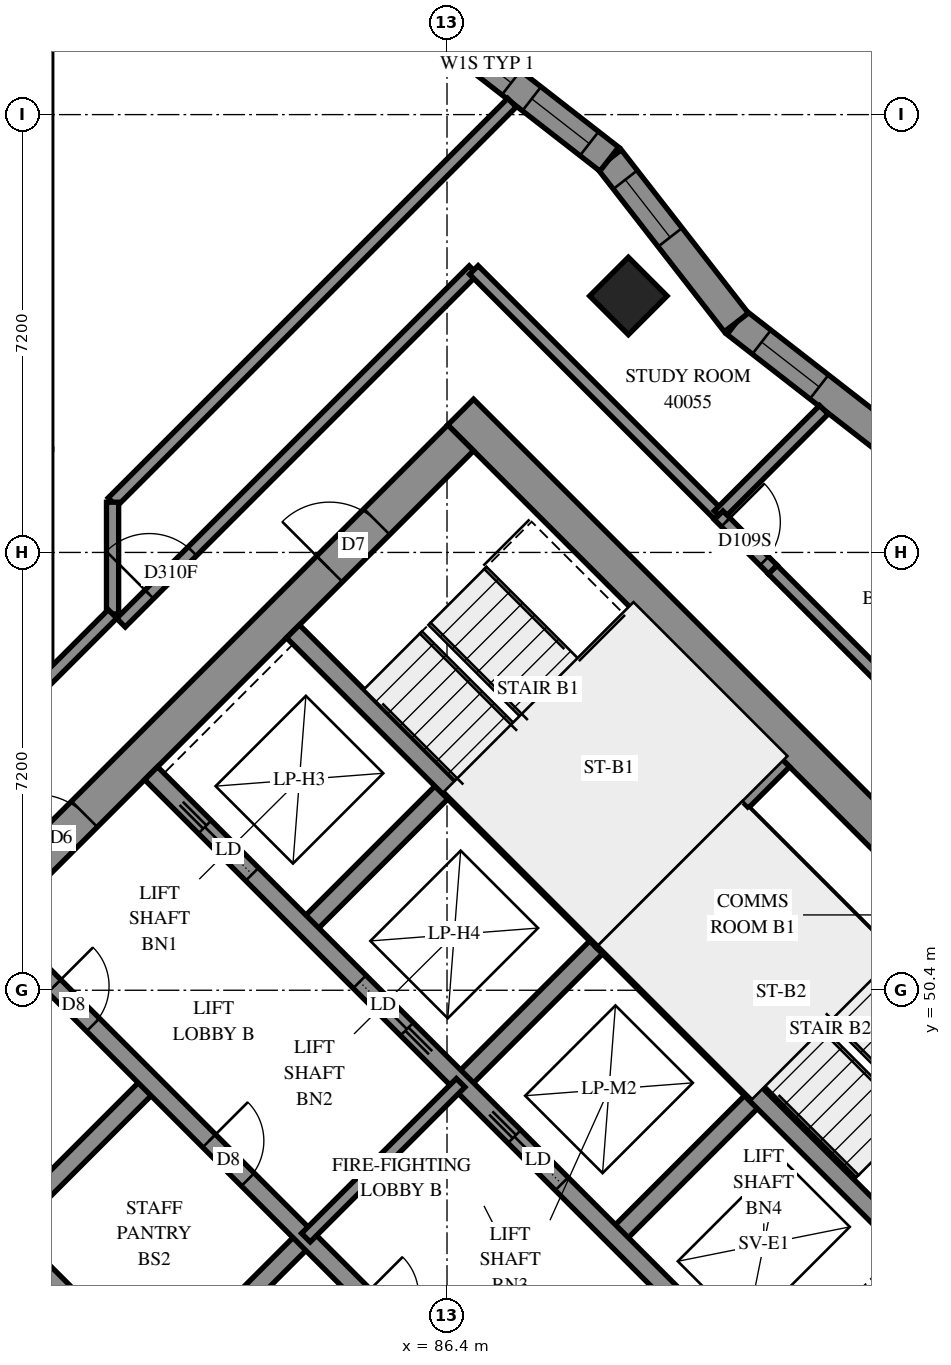
"""IFC4 building model, lengths in metres.
Left out: names, types, materials, properties, quantities, classifications, styles, units other than length and angle.
Written with IfcOpenShell. Run it as: python <this file> out.ifc"""

import sys

from ifc_helpers import new_model, si_unit, direction, frame, frame_2d, origin, origin_2d, place, context, subcontext, project, spatial, polyline, rectangle, outline, extrude, element, fill, save


model = new_model("IFC4")
c1 = context("Model", 3, precision=1e-05, world=origin(), true_north=direction((0.0, 1.0)))
c2 = subcontext(c1, "Body", "Model", "MODEL_VIEW")
j1 = project(units=[si_unit("LENGTHUNIT", "METRE"), si_unit("PLANEANGLEUNIT", "RADIAN")], contexts=[c1])
p1 = place(None, origin())
s1 = spatial("IfcSite", under=j1, at=p1, CompositionType="ELEMENT")
p2 = place(p1, origin())
s2 = spatial("IfcBuilding", under=s1, at=p2, CompositionType="ELEMENT")
p3 = place(p2, frame((0.0, 0.0, 149.0)))
s3 = spatial("IfcBuildingStorey", under=s2, at=p3, CompositionType="ELEMENT", Elevation=149.0)
p4 = place(p3, frame((89.382, 61.818, 0.0), z_axis=(0.0, 0.0, 1.0), x_axis=(0.7071067812, -0.7071067812, 0.0)))
e1 = element("IfcColumn", 1, at=p4, inside=s3, PredefinedType="COLUMN", context=c2, shape_type="SweptSolid", body=[
    extrude(rectangle(XDim=0.9, YDim=0.9, at=origin_2d()), origin(), (0.0, 0.0, 1.0), 3.1),
])
p5 = place(p3, frame((76.018, 49.302, -0.3), z_axis=(0.0, 0.0, 1.0), x_axis=(0.7071067812, -0.7071067812, 0.0)))
e2 = element("IfcWall", 2, at=p5, inside=s3, PredefinedType="SHEAR", context=c2, shape_type="SweptSolid", body=[
    extrude(rectangle(XDim=15.6, YDim=0.6, at=frame_2d((7.8, 0.0))), origin(), (0.0, 0.0, 1.0), 2.7),
])
p6 = place(p3, frame((86.625, 59.908, -0.3), z_axis=(0.0, 0.0, 1.0), x_axis=(0.7071067812, -0.7071067812, 0.0)))
e3 = element("IfcWall", 3, at=p6, inside=s3, PredefinedType="SHEAR", context=c2, shape_type="SweptSolid", body=[
    extrude(rectangle(XDim=15.6, YDim=0.6, at=frame_2d((7.8, 0.0))), origin(), (0.0, 0.0, 1.0), 2.7),
])
p7 = place(p6, frame((10.6, 0.0, 0.3)))
e4 = element("IfcOpeningElement", 4, at=p7, cuts=e3, PredefinedType="OPENING", context=c2, shape_type="SweptSolid", body=[
    extrude(rectangle(XDim=0.8, YDim=2.1, at=frame_2d((0.4, 1.05))), frame((0.0, 0.31, 0.0), z_axis=(0.0, -1.0, 0.0), x_axis=(1.0, 0.0, 0.0)), (0.0, 0.0, 1.0), 0.62),
])
p8 = place(p3, frame((76.442, 49.302, -0.3), z_axis=(0.0, 0.0, 1.0), x_axis=(0.7071067812, 0.7071067812, 0.0)))
e5 = element("IfcWall", 5, at=p8, inside=s3, PredefinedType="SHEAR", context=c2, shape_type="SweptSolid", body=[
    extrude(rectangle(XDim=14.4, YDim=0.6, at=frame_2d((7.2, 0.0))), origin(), (0.0, 0.0, 1.0), 2.7),
])
p9 = place(p8, frame((4.55, 0.0, 0.3)))
e6 = element("IfcOpeningElement", 6, at=p9, cuts=e5, PredefinedType="OPENING", context=c2, shape_type="SweptSolid", body=[
    extrude(rectangle(XDim=1.1, YDim=2.1, at=frame_2d((0.55, 1.05))), frame((0.0, 0.31, 0.0), z_axis=(0.0, -1.0, 0.0), x_axis=(1.0, 0.0, 0.0)), (0.0, 0.0, 1.0), 0.62),
])
p10 = place(p8, frame((11.35, 0.0, 0.3)))
e7 = element("IfcOpeningElement", 7, at=p10, cuts=e5, PredefinedType="OPENING", context=c2, shape_type="SweptSolid", body=[
    extrude(rectangle(XDim=1.1, YDim=2.1, at=frame_2d((0.55, 1.05))), frame((0.0, 0.31, 0.0), z_axis=(0.0, -1.0, 0.0), x_axis=(1.0, 0.0, 0.0)), (0.0, 0.0, 1.0), 0.62),
])
p11 = place(p3, frame((87.049, 38.695, -0.3), z_axis=(0.0, 0.0, 1.0), x_axis=(0.7071067812, 0.7071067812, 0.0)))
e8 = element("IfcWall", 8, at=p11, inside=s3, PredefinedType="SHEAR", context=c2, shape_type="SweptSolid", body=[
    extrude(rectangle(XDim=14.4, YDim=0.6, at=frame_2d((7.2, 0.0))), origin(), (0.0, 0.0, 1.0), 2.7),
])
p12 = place(p11, frame((4.55, 0.0, 0.3)))
e9 = element("IfcOpeningElement", 9, at=p12, cuts=e8, PredefinedType="OPENING", context=c2, shape_type="SweptSolid", body=[
    extrude(rectangle(XDim=1.1, YDim=2.1, at=frame_2d((0.55, 1.05))), frame((0.0, 0.31, 0.0), z_axis=(0.0, -1.0, 0.0), x_axis=(1.0, 0.0, 0.0)), (0.0, 0.0, 1.0), 0.62),
])
p13 = place(p11, frame((11.35, 0.0, 0.3)))
e10 = element("IfcOpeningElement", 10, at=p13, cuts=e8, PredefinedType="OPENING", context=c2, shape_type="SweptSolid", body=[
    extrude(rectangle(XDim=1.1, YDim=2.1, at=frame_2d((0.55, 1.05))), frame((0.0, 0.31, 0.0), z_axis=(0.0, -1.0, 0.0), x_axis=(1.0, 0.0, 0.0)), (0.0, 0.0, 1.0), 0.62),
])
for number, where, z_axis, x_axis in (
    (11, (79.2, 46.544, 0.0), (0.0, 0.0, 1.0), (0.707, 0.707, 0.0)),
    (12, (84.079, 51.423, 0.0), (0.0, 0.0, 1.0), (0.707, 0.707, 0.0)),
):
    element("IfcWall", number, at=place(p3, frame(where, z_axis=z_axis, x_axis=x_axis)), inside=s3, PredefinedType="SOLIDWALL", context=c2, shape_type="SweptSolid", body=[
        extrude(rectangle(XDim=3.3, YDim=0.3, at=frame_2d((1.65, 0.0))), origin(), (0.0, 0.0, 1.0), 3.1),
    ])
p14 = place(p3, frame((81.746, 43.999, 0.0), z_axis=(0.0, 0.0, 1.0), x_axis=(0.7071067812, 0.7071067812, 0.0)))
e13 = element("IfcWall", 13, at=p14, inside=s3, PredefinedType="SOLIDWALL", context=c2, shape_type="SweptSolid", body=[
    extrude(rectangle(XDim=3.3, YDim=0.3, at=frame_2d((1.65, 0.0))), origin(), (0.0, 0.0, 1.0), 3.1),
])
for number, where, z_axis, x_axis in (
    (14, (86.625, 48.878, 0.0), (0.0, 0.0, 1.0), (0.707, 0.707, 0.0)),
    (15, (89.17, 46.332, 0.0), (0.0, 0.0, 1.0), (0.707, 0.707, 0.0)),
):
    element("IfcWall", number, at=place(p3, frame(where, z_axis=z_axis, x_axis=x_axis)), inside=s3, PredefinedType="SOLIDWALL", context=c2, shape_type="SweptSolid", body=[
        extrude(rectangle(XDim=3.3, YDim=0.3, at=frame_2d((1.65, 0.0))), origin(), (0.0, 0.0, 1.0), 3.1),
    ])
p15 = place(p3, frame((78.988, 51.423, 0.0), z_axis=(0.0, 0.0, 1.0), x_axis=(0.7071067812, -0.7071067812, 0.0)))
e16 = element("IfcWall", 16, at=p15, inside=s3, PredefinedType="SOLIDWALL", context=c2, shape_type="SweptSolid", body=[
    extrude(rectangle(XDim=14.4, YDim=0.3, at=frame_2d((7.2, 0.0))), origin(), (0.0, 0.0, 1.0), 3.1),
])
p16 = place(p15, frame((1.35, 0.0, 0.0)))
e17 = element("IfcOpeningElement", 17, at=p16, cuts=e16, PredefinedType="OPENING", context=c2, shape_type="SweptSolid", body=[
    extrude(rectangle(XDim=0.9, YDim=2.1, at=frame_2d((0.45, 1.05))), frame((0.0, 0.16, 0.0), z_axis=(0.0, -1.0, 0.0), x_axis=(1.0, 0.0, 0.0)), (0.0, 0.0, 1.0), 0.32),
])
p17 = place(p15, frame((4.95, 0.0, 0.0)))
e18 = element("IfcOpeningElement", 18, at=p17, cuts=e16, PredefinedType="OPENING", context=c2, shape_type="SweptSolid", body=[
    extrude(rectangle(XDim=0.9, YDim=2.1, at=frame_2d((0.45, 1.05))), frame((0.0, 0.16, 0.0), z_axis=(0.0, -1.0, 0.0), x_axis=(1.0, 0.0, 0.0)), (0.0, 0.0, 1.0), 0.32),
])
p18 = place(p15, frame((8.55, 0.0, 0.0)))
e19 = element("IfcOpeningElement", 19, at=p18, cuts=e16, PredefinedType="OPENING", context=c2, shape_type="SweptSolid", body=[
    extrude(rectangle(XDim=0.9, YDim=2.1, at=frame_2d((0.45, 1.05))), frame((0.0, 0.16, 0.0), z_axis=(0.0, -1.0, 0.0), x_axis=(1.0, 0.0, 0.0)), (0.0, 0.0, 1.0), 0.32),
])
p19 = place(p15, frame((12.05, 0.0, 0.0)))
e20 = element("IfcOpeningElement", 20, at=p19, cuts=e16, PredefinedType="OPENING", context=c2, shape_type="SweptSolid", body=[
    extrude(rectangle(XDim=1.1, YDim=2.1, at=frame_2d((0.55, 1.05))), frame((0.0, 0.16, 0.0), z_axis=(0.0, -1.0, 0.0), x_axis=(1.0, 0.0, 0.0)), (0.0, 0.0, 1.0), 0.32),
])
p20 = place(p3, frame((81.534, 53.969, 0.0), z_axis=(0.0, 0.0, 1.0), x_axis=(0.707103309, -0.7071102534, 0.0)))
e21 = element("IfcWall", 21, at=p20, inside=s3, PredefinedType="SOLIDWALL", context=c2, shape_type="SweptSolid", body=[
    extrude(rectangle(XDim=14.4, YDim=0.3, at=frame_2d((7.2, 0.0))), origin(), (0.0, 0.0, 1.0), 3.1),
])
p21 = place(p20, frame((1.25, 0.0, 0.0)))
e22 = element("IfcOpeningElement", 22, at=p21, cuts=e21, PredefinedType="OPENING", context=c2, shape_type="SweptSolid", body=[
    extrude(rectangle(XDim=1.1, YDim=2.1, at=frame_2d((0.55, 1.05))), frame((0.0, 0.16, 0.0), z_axis=(0.0, -1.0, 0.0), x_axis=(1.0, 0.0, 0.0)), (0.0, 0.0, 1.0), 0.32),
])
p22 = place(p20, frame((4.85, 0.0, 0.0)))
e23 = element("IfcOpeningElement", 23, at=p22, cuts=e21, PredefinedType="OPENING", context=c2, shape_type="SweptSolid", body=[
    extrude(rectangle(XDim=1.1, YDim=2.1, at=frame_2d((0.55, 1.05))), frame((0.0, 0.16, 0.0), z_axis=(0.0, -1.0, 0.0), x_axis=(1.0, 0.0, 0.0)), (0.0, 0.0, 1.0), 0.32),
])
p23 = place(p20, frame((8.45, 0.0, 0.0)))
e24 = element("IfcOpeningElement", 24, at=p23, cuts=e21, PredefinedType="OPENING", context=c2, shape_type="SweptSolid", body=[
    extrude(rectangle(XDim=1.1, YDim=2.1, at=frame_2d((0.55, 1.05))), frame((0.0, 0.16, 0.0), z_axis=(0.0, -1.0, 0.0), x_axis=(1.0, 0.0, 0.0)), (0.0, 0.0, 1.0), 0.32),
])
p24 = place(p20, frame((12.05, 0.0, 0.0)))
e25 = element("IfcOpeningElement", 25, at=p24, cuts=e21, PredefinedType="OPENING", context=c2, shape_type="SweptSolid", body=[
    extrude(rectangle(XDim=1.1, YDim=2.1, at=frame_2d((0.55, 1.05))), frame((0.0, 0.16, 0.0), z_axis=(0.0, -1.0, 0.0), x_axis=(1.0, 0.0, 0.0)), (0.0, 0.0, 1.0), 0.32),
])
for number, where, z_axis, x_axis in (
    (26, (83.867, 56.302, 0.0), (0.0, 0.0, 1.0), (0.707, -0.707, 0.0)),
    (27, (88.958, 51.211, 0.0), (0.0, 0.0, 1.0), (0.707, -0.707, 0.0)),
):
    element("IfcWall", number, at=place(p3, frame(where, z_axis=z_axis, x_axis=x_axis)), inside=s3, PredefinedType="SOLIDWALL", context=c2, shape_type="SweptSolid", body=[
        extrude(rectangle(XDim=7.2, YDim=0.3, at=frame_2d((3.6, 0.0))), origin(), (0.0, 0.0, 1.0), 3.1),
    ])
p25 = place(p3, frame((88.958, 51.211, 0.0), z_axis=(0.0, 0.0, 1.0), x_axis=(0.7071067812, 0.7071067812, 0.0)))
e28 = element("IfcWall", 28, at=p25, inside=s3, PredefinedType="SOLIDWALL", context=c2, shape_type="SweptSolid", body=[
    extrude(rectangle(XDim=4.2, YDim=0.3, at=frame_2d((2.1, 0.0))), origin(), (0.0, 0.0, 1.0), 3.1),
])
p26 = place(p3, frame((93.844, 59.293, 0.0), z_axis=(0.0, 0.0, 1.0), x_axis=(-0.7891591282, 0.6141887905, 0.0)))
e29 = element("IfcWall", 29, at=p26, inside=s3, PredefinedType="SOLIDWALL", context=c2, shape_type="SweptSolid", body=[
    extrude(outline(polyline([(-0.031, -0.25), (3.372, -0.25), (3.434, 0.25), (0.031, 0.25), (-0.031, -0.25)])), origin(), (0.0, 0.0, 1.0), 3.1),
])
p27 = place(p26, frame((1.677, 0.0, 0.45)))
e30 = element("IfcOpeningElement", 30, at=p27, cuts=e29, PredefinedType="OPENING", context=c2, shape_type="SweptSolid", body=[
    extrude(rectangle(XDim=1.2, YDim=2.5, at=frame_2d((0.6, 1.25))), frame((0.0, 0.26, 0.0), z_axis=(0.0, -1.0, 0.0), x_axis=(1.0, 0.0, 0.0)), (0.0, 0.0, 1.0), 0.52),
])
p28 = place(p3, frame((91.158, 61.383, 0.0), z_axis=(0.0, 0.0, 1.0), x_axis=(-0.6141847326, 0.7891622864, 0.0)))
e31 = element("IfcWall", 31, at=p28, inside=s3, PredefinedType="SOLIDWALL", context=c2, shape_type="SweptSolid", body=[
    extrude(outline(polyline([(0.031, -0.25), (3.434, -0.25), (3.372, 0.25), (-0.031, 0.25), (0.031, -0.25)])), origin(), (0.0, 0.0, 1.0), 3.1),
])
p29 = place(p28, frame((1.774, 0.0, 0.45)))
e32 = element("IfcOpeningElement", 32, at=p29, cuts=e31, PredefinedType="OPENING", context=c2, shape_type="SweptSolid", body=[
    extrude(rectangle(XDim=1.2, YDim=2.5, at=frame_2d((0.6, 1.25))), frame((0.0, 0.26, 0.0), z_axis=(0.0, -1.0, 0.0), x_axis=(1.0, 0.0, 0.0)), (0.0, 0.0, 1.0), 0.52),
])
p30 = place(p3, frame((89.068, 64.068, 0.0), z_axis=(0.0, 0.0, 1.0), x_axis=(-0.7891591282, 0.6141887905, 0.0)))
e33 = element("IfcWall", 33, at=p30, inside=s3, PredefinedType="SOLIDWALL", context=c2, shape_type="SweptSolid", body=[
    extrude(outline(polyline([(-0.031, -0.25), (3.372, -0.25), (3.434, 0.25), (0.031, 0.25), (-0.031, -0.25)])), origin(), (0.0, 0.0, 1.0), 3.1),
])
p31 = place(p30, frame((0.416, 0.0, 0.45)))
e34 = element("IfcOpeningElement", 34, at=p31, cuts=e33, PredefinedType="OPENING", context=c2, shape_type="SweptSolid", body=[
    extrude(rectangle(XDim=1.2, YDim=2.5, at=frame_2d((0.6, 1.25))), frame((0.0, 0.26, 0.0), z_axis=(0.0, -1.0, 0.0), x_axis=(1.0, 0.0, 0.0)), (0.0, 0.0, 1.0), 0.52),
])
p32 = place(p30, frame((2.043, 0.0, 0.45)))
e35 = element("IfcOpeningElement", 35, at=p32, cuts=e33, PredefinedType="OPENING", context=c2, shape_type="SweptSolid", body=[
    extrude(rectangle(XDim=1.0, YDim=2.5, at=frame_2d((0.5, 1.25))), frame((0.0, 0.26, 0.0), z_axis=(0.0, -1.0, 0.0), x_axis=(1.0, 0.0, 0.0)), (0.0, 0.0, 1.0), 0.52),
])
p33 = place(p3, frame((91.313, 53.354, 0.0), z_axis=(0.0, 0.0, 1.0), x_axis=(0.7071067812, -0.7071067812, 0.0)))
e36 = element("IfcWall", 36, at=p33, inside=s3, PredefinedType="PARTITIONING", context=c2, shape_type="SweptSolid", body=[
    extrude(rectangle(XDim=5.95, YDim=0.15, at=frame_2d((2.975, 0.0))), origin(), (0.0, 0.0, 1.0), 3.1),
])
p34 = place(p3, frame((84.079, 46.332, 0.0), z_axis=(0.0, 0.0, 1.0), x_axis=(0.7071067812, 0.7071067812, 0.0)))
e37 = element("IfcWall", 37, at=p34, inside=s3, PredefinedType="PARTITIONING", context=c2, shape_type="SweptSolid", body=[
    extrude(rectangle(XDim=3.6, YDim=0.2, at=frame_2d((1.8, 0.0))), origin(), (0.0, 0.0, 1.0), 3.1),
])
p35 = place(p3, frame((91.755, 57.317, 0.0), z_axis=(0.0, 0.0, 1.0), x_axis=(0.7071067812, -0.7071067812, 0.0)))
e38 = element("IfcWall", 38, at=p35, inside=s3, PredefinedType="PARTITIONING", context=c2, shape_type="SweptSolid", body=[
    extrude(rectangle(XDim=11.639, YDim=0.2, at=frame_2d((5.819, 0.0))), origin(), (0.0, 0.0, 1.0), 3.1),
])
p36 = place(p3, frame((80.899, 58.427, 0.0), z_axis=(0.0, 0.0, 1.0), x_axis=(0.707112163, 0.7071013993, 0.0)))
e39 = element("IfcWall", 39, at=p36, inside=s3, PredefinedType="PARTITIONING", context=c2, shape_type="SweptSolid", body=[
    extrude(rectangle(XDim=9.29, YDim=0.2, at=frame_2d((4.645, 0.0))), origin(), (0.0, 0.0, 1.0), 3.1),
])
p37 = place(p3, frame((81.038, 56.444, 0.0), z_axis=(0.0, 0.0, 1.0), x_axis=(0.7071067812, 0.7071067812, 0.0)))
e40 = element("IfcWall", 40, at=p37, inside=s3, PredefinedType="PARTITIONING", context=c2, shape_type="SweptSolid", body=[
    extrude(rectangle(XDim=8.2, YDim=0.2, at=frame_2d((4.1, 0.0))), origin(), (0.0, 0.0, 1.0), 3.1),
])
p38 = place(p37, frame((0.66, 0.0, 0.0)))
e41 = element("IfcOpeningElement", 41, at=p38, cuts=e40, PredefinedType="OPENING", context=c2, shape_type="SweptSolid", body=[
    extrude(rectangle(XDim=1.0, YDim=2.1, at=frame_2d((0.5, 1.05))), frame((0.0, 0.11, 0.0), z_axis=(0.0, -1.0, 0.0), x_axis=(1.0, 0.0, 0.0)), (0.0, 0.0, 1.0), 0.22),
])
p39 = place(p3, frame((86.841, 62.245, 0.0), z_axis=(0.0, 0.0, 1.0), x_axis=(0.7071067812, -0.7071067812, 0.0)))
e42 = element("IfcWall", 42, at=p39, inside=s3, PredefinedType="PARTITIONING", context=c2, shape_type="SweptSolid", body=[
    extrude(rectangle(XDim=5.699, YDim=0.2, at=frame_2d((2.85, 0.0))), origin(), (0.0, 0.0, 1.0), 3.1),
])
p40 = place(p3, frame((90.867, 58.213, 0.0), z_axis=(0.0, 0.0, 1.0), x_axis=(0.7066165577, 0.707596665, 0.0)))
e43 = element("IfcWall", 43, at=p40, inside=s3, PredefinedType="PARTITIONING", context=c2, shape_type="SweptSolid", body=[
    extrude(rectangle(XDim=2.449, YDim=0.2, at=frame_2d((1.224, 0.0))), origin(), (0.0, 0.0, 1.0), 3.1),
])
p41 = place(p3, frame((80.9, 56.588, 0.0), z_axis=(0.0, 0.0, 1.0), x_axis=(0.0, 1.0, 0.0)))
e44 = element("IfcWall", 44, at=p41, inside=s3, PredefinedType="PARTITIONING", context=c2, shape_type="SweptSolid", body=[
    extrude(rectangle(XDim=1.838, YDim=0.2, at=frame_2d((0.919, 0.0))), origin(), (0.0, 0.0, 1.0), 3.1),
])
p42 = place(p3, frame((79.801, 55.491, 0.0), z_axis=(0.0, 0.0, 1.0), x_axis=(0.7071067812, 0.7071067812, 0.0)))
e45 = element("IfcWall", 45, at=p42, inside=s3, PredefinedType="PARTITIONING", context=c2, shape_type="SweptSolid", body=[
    extrude(rectangle(XDim=1.553, YDim=0.2, at=frame_2d((0.776, 0.0))), origin(), (0.0, 0.0, 1.0), 3.1),
])
p43 = place(p3, frame((90.867, 58.211, 0.0), z_axis=(0.0, 0.0, 1.0), x_axis=(0.706312726, -0.7078999456, 0.0)))
e46 = element("IfcWall", 46, at=p43, inside=s3, PredefinedType="PARTITIONING", context=c2, shape_type="SweptSolid", body=[
    extrude(rectangle(XDim=1.26, YDim=0.2, at=frame_2d((0.63, 0.0))), origin(), (0.0, 0.0, 1.0), 3.1),
])
p44 = place(p43, frame((0.162, 0.0, 0.0)))
e47 = element("IfcOpeningElement", 47, at=p44, cuts=e46, PredefinedType="OPENING", context=c2, shape_type="SweptSolid", body=[
    extrude(rectangle(XDim=0.9, YDim=2.1, at=frame_2d((0.45, 1.05))), frame((0.0, 0.11, 0.0), z_axis=(0.0, -1.0, 0.0), x_axis=(1.0, 0.0, 0.0)), (0.0, 0.0, 1.0), 0.22),
])
p45 = place(p27, origin())
e48 = element("IfcWindow", 48, at=p45, inside=s3, PartitioningType="SINGLE_PANEL", PredefinedType="WINDOW", context=c2, shape_type="SweptSolid", body=[
    extrude(rectangle(XDim=1.2, YDim=2.5, at=frame_2d((0.6, 1.25))), frame((0.0, 0.18, 0.0), z_axis=(0.0, -1.0, 0.0), x_axis=(1.0, 0.0, 0.0)), (0.0, 0.0, 1.0), 0.06),
])
fill(e30, e48)
p46 = place(p29, origin())
e49 = element("IfcWindow", 49, at=p46, inside=s3, PartitioningType="SINGLE_PANEL", PredefinedType="WINDOW", context=c2, shape_type="SweptSolid", body=[
    extrude(rectangle(XDim=1.2, YDim=2.5, at=frame_2d((0.6, 1.25))), frame((0.0, 0.18, 0.0), z_axis=(0.0, -1.0, 0.0), x_axis=(1.0, 0.0, 0.0)), (0.0, 0.0, 1.0), 0.06),
])
fill(e32, e49)
p47 = place(p31, origin())
e50 = element("IfcWindow", 50, at=p47, inside=s3, PartitioningType="SINGLE_PANEL", PredefinedType="WINDOW", context=c2, shape_type="SweptSolid", body=[
    extrude(rectangle(XDim=1.2, YDim=2.5, at=frame_2d((0.6, 1.25))), frame((0.0, 0.18, 0.0), z_axis=(0.0, -1.0, 0.0), x_axis=(1.0, 0.0, 0.0)), (0.0, 0.0, 1.0), 0.06),
])
fill(e34, e50)
p48 = place(p9, origin())
e51 = element("IfcDoor", 51, at=p48, inside=s3, OperationType="DOUBLE_DOOR_SINGLE_SWING", PredefinedType="DOOR", context=c2, shape_type="SweptSolid", body=[
    extrude(rectangle(XDim=1.1, YDim=2.1, at=frame_2d((0.55, 1.05))), frame((0.0, 0.025, 0.0), z_axis=(0.0, -1.0, 0.0), x_axis=(1.0, 0.0, 0.0)), (0.0, 0.0, 1.0), 0.05),
])
fill(e6, e51)
p49 = place(p10, origin())
e52 = element("IfcDoor", 52, at=p49, inside=s3, OperationType="SINGLE_SWING_LEFT", PredefinedType="DOOR", context=c2, shape_type="SweptSolid", body=[
    extrude(rectangle(XDim=1.1, YDim=2.1, at=frame_2d((0.55, 1.05))), frame((0.0, 0.025, 0.0), z_axis=(0.0, -1.0, 0.0), x_axis=(1.0, 0.0, 0.0)), (0.0, 0.0, 1.0), 0.05),
])
fill(e7, e52)
p50 = place(p16, origin())
e53 = element("IfcDoor", 53, at=p50, inside=s3, OperationType="SINGLE_SWING_LEFT", PredefinedType="DOOR", context=c2, shape_type="SweptSolid", body=[
    extrude(rectangle(XDim=0.9, YDim=2.1, at=frame_2d((0.45, 1.05))), frame((0.0, 0.025, 0.0), z_axis=(0.0, -1.0, 0.0), x_axis=(1.0, 0.0, 0.0)), (0.0, 0.0, 1.0), 0.05),
])
fill(e17, e53)
p51 = place(p17, origin())
e54 = element("IfcDoor", 54, at=p51, inside=s3, OperationType="SINGLE_SWING_LEFT", PredefinedType="DOOR", context=c2, shape_type="SweptSolid", body=[
    extrude(rectangle(XDim=0.9, YDim=2.1, at=frame_2d((0.45, 1.05))), frame((0.0, 0.025, 0.0), z_axis=(0.0, -1.0, 0.0), x_axis=(1.0, 0.0, 0.0)), (0.0, 0.0, 1.0), 0.05),
])
fill(e18, e54)
p52 = place(p21, origin())
e55 = element("IfcDoor", 55, at=p52, inside=s3, OperationType="SLIDING_TO_LEFT", PredefinedType="DOOR", context=c2, shape_type="SweptSolid", body=[
    extrude(rectangle(XDim=1.1, YDim=2.1, at=frame_2d((0.55, 1.05))), frame((0.0, 0.025, 0.0), z_axis=(0.0, -1.0, 0.0), x_axis=(1.0, 0.0, 0.0)), (0.0, 0.0, 1.0), 0.05),
])
fill(e22, e55)
p53 = place(p22, origin())
e56 = element("IfcDoor", 56, at=p53, inside=s3, OperationType="SLIDING_TO_RIGHT", PredefinedType="DOOR", context=c2, shape_type="SweptSolid", body=[
    extrude(rectangle(XDim=1.1, YDim=2.1, at=frame_2d((0.55, 1.05))), frame((0.0, 0.025, 0.0), z_axis=(0.0, -1.0, 0.0), x_axis=(1.0, 0.0, 0.0)), (0.0, 0.0, 1.0), 0.05),
])
fill(e23, e56)
p54 = place(p23, origin())
e57 = element("IfcDoor", 57, at=p54, inside=s3, OperationType="SLIDING_TO_LEFT", PredefinedType="DOOR", context=c2, shape_type="SweptSolid", body=[
    extrude(rectangle(XDim=1.1, YDim=2.1, at=frame_2d((0.55, 1.05))), frame((0.0, 0.025, 0.0), z_axis=(0.0, -1.0, 0.0), x_axis=(1.0, 0.0, 0.0)), (0.0, 0.0, 1.0), 0.05),
])
fill(e24, e57)
p55 = place(p38, origin())
e58 = element("IfcDoor", 58, at=p55, inside=s3, OperationType="SINGLE_SWING_RIGHT", PredefinedType="DOOR", context=c2, shape_type="SweptSolid", body=[
    extrude(rectangle(XDim=1.0, YDim=2.1, at=frame_2d((0.5, 1.05))), frame((0.0, 0.025, 0.0), z_axis=(0.0, -1.0, 0.0), x_axis=(1.0, 0.0, 0.0)), (0.0, 0.0, 1.0), 0.05),
])
fill(e41, e58)
p56 = place(p44, origin())
e59 = element("IfcDoor", 59, at=p56, inside=s3, OperationType="SINGLE_SWING_RIGHT", PredefinedType="DOOR", context=c2, shape_type="SweptSolid", body=[
    extrude(rectangle(XDim=0.9, YDim=2.1, at=frame_2d((0.45, 1.05))), frame((0.0, 0.025, 0.0), z_axis=(0.0, -1.0, 0.0), x_axis=(1.0, 0.0, 0.0)), (0.0, 0.0, 1.0), 0.05),
])
fill(e47, e59)
p57 = place(p32, origin())
e60 = element("IfcWindow", 60, at=p57, inside=s3, PartitioningType="SINGLE_PANEL", PredefinedType="WINDOW", context=c2, shape_type="SweptSolid", body=[
    extrude(rectangle(XDim=1.0, YDim=2.5, at=frame_2d((0.5, 1.25))), frame((0.0, 0.18, 0.0), z_axis=(0.0, -1.0, 0.0), x_axis=(1.0, 0.0, 0.0)), (0.0, 0.0, 1.0), 0.06),
])
fill(e35, e60)
save(model, sys.argv[1])
